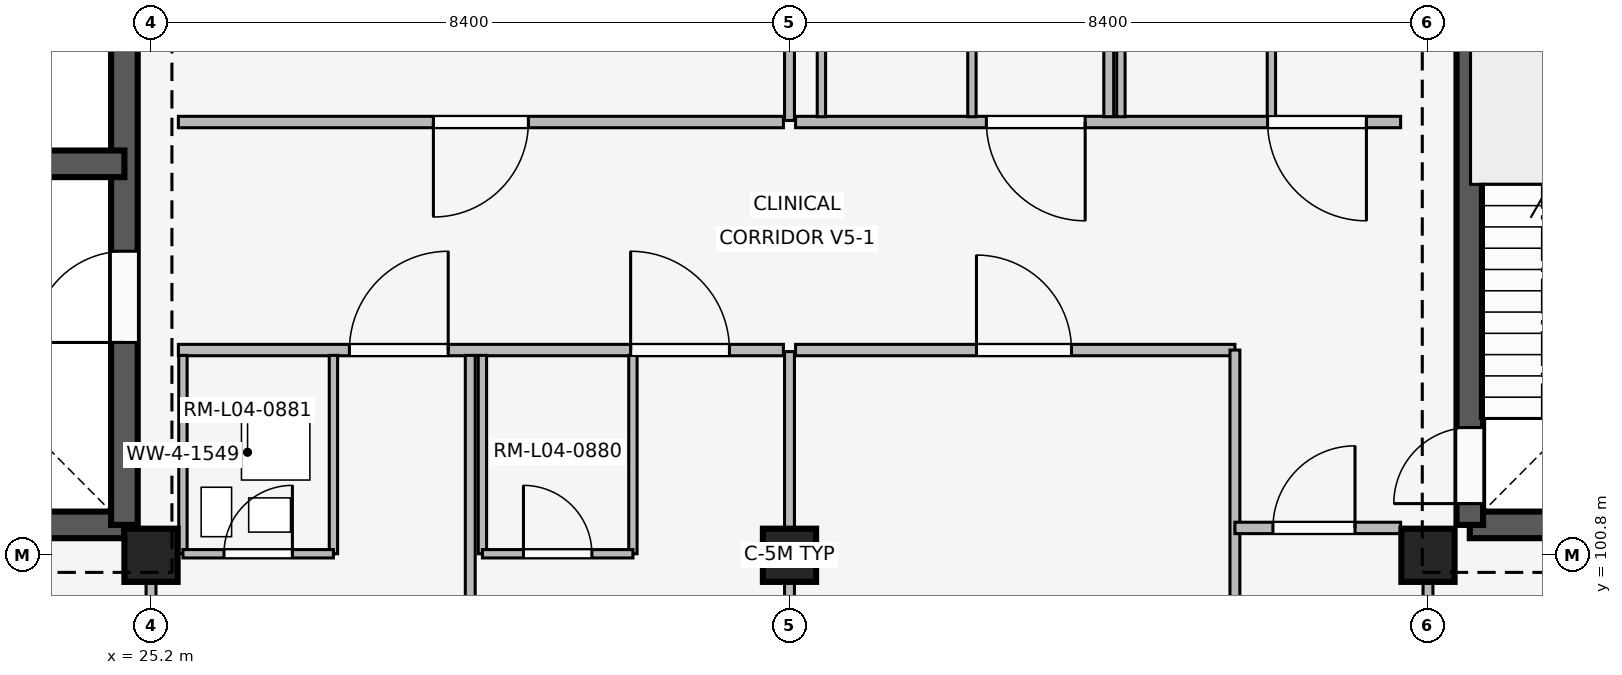
"""IFC4 building model, lengths in metres.
Left out: names, types, materials, properties, quantities, classifications, styles, units other than length and angle.
Written with IfcOpenShell. Run it as: python <this file> out.ifc"""

import sys

from ifc_helpers import new_model, si_unit, direction, frame, frame_2d, origin, origin_2d, place, context, subcontext, project, spatial, rectangle, extrude, element, fill, save


model = new_model("IFC4")
c1 = context("Model", 3, precision=1e-05, world=origin(), true_north=direction((0.0, 1.0)))
c2 = subcontext(c1, "Body", "Model", "MODEL_VIEW")
j1 = project(units=[si_unit("LENGTHUNIT", "METRE"), si_unit("PLANEANGLEUNIT", "RADIAN")], contexts=[c1])
p1 = place(None, origin())
s1 = spatial("IfcSite", under=j1, at=p1, CompositionType="ELEMENT")
p2 = place(p1, origin())
s2 = spatial("IfcBuilding", under=s1, at=p2, CompositionType="ELEMENT")
p3 = place(p2, frame((0.0, 0.0, 16.2)))
s3 = spatial("IfcBuildingStorey", under=s2, at=p3, CompositionType="ELEMENT", Elevation=16.2)
for number, where, z_axis, x_axis in (
    (1, (25.2, 100.8, 0.0), (0.0, 0.0, 1.0), (1.0, 0.0, 0.0)),
    (2, (33.6, 100.8, 0.0), (0.0, 0.0, 1.0), (1.0, 0.0, 0.0)),
    (3, (42.0, 100.8, 0.0), (0.0, 0.0, 1.0), (1.0, 0.0, 0.0)),
):
    element("IfcColumn", number, at=place(p3, frame(where, z_axis=z_axis, x_axis=x_axis)), inside=s3, PredefinedType="COLUMN", context=c2, shape_type="SweptSolid", body=[
        extrude(rectangle(XDim=0.7, YDim=0.7, at=origin_2d()), origin(), (0.0, 0.0, 1.0), 4.2),
    ])
p4 = place(p3, frame((42.55, 101.2, 0.0), z_axis=(0.0, 0.0, 1.0), x_axis=(1.0, 0.0, 0.0)))
e4 = element("IfcWall", 4, at=p4, inside=s3, PredefinedType="SHEAR", context=c2, shape_type="SweptSolid", body=[
    extrude(rectangle(XDim=7.5, YDim=0.35, at=frame_2d((3.75, 0.0))), origin(), (0.0, 0.0, 1.0), 3.92),
])
p5 = place(p4, frame((4.85, 0.0, 0.0)))
e5 = element("IfcOpeningElement", 5, at=p5, cuts=e4, PredefinedType="OPENING", context=c2, shape_type="SweptSolid", body=[
    extrude(rectangle(XDim=1.2, YDim=2.2, at=frame_2d((0.6, 1.1))), frame((0.0, 0.185, 0.0), z_axis=(0.0, -1.0, 0.0), x_axis=(1.0, 0.0, 0.0)), (0.0, 0.0, 1.0), 0.37),
])
p6 = place(p3, frame((42.55, 101.2, 0.0), z_axis=(0.0, 0.0, 1.0), x_axis=(0.0, 1.0, 0.0)))
e6 = element("IfcWall", 6, at=p6, inside=s3, PredefinedType="SHEAR", context=c2, shape_type="SweptSolid", body=[
    extrude(rectangle(XDim=7.55, YDim=0.35, at=frame_2d((3.775, 0.0))), origin(), (0.0, 0.0, 1.0), 3.92),
])
p7 = place(p6, frame((0.28, 0.0, 0.0)))
e7 = element("IfcOpeningElement", 7, at=p7, cuts=e6, PredefinedType="OPENING", context=c2, shape_type="SweptSolid", body=[
    extrude(rectangle(XDim=1.0, YDim=2.15, at=frame_2d((0.5, 1.075))), frame((0.0, 0.185, 0.0), z_axis=(0.0, -1.0, 0.0), x_axis=(1.0, 0.0, 0.0)), (0.0, 0.0, 1.0), 0.37),
])
p8 = place(p3, frame((17.35, 101.2, 0.0), z_axis=(0.0, 0.0, 1.0), x_axis=(1.0, 0.0, 0.0)))
e8 = element("IfcWall", 8, at=p8, inside=s3, PredefinedType="SHEAR", context=c2, shape_type="SweptSolid", body=[
    extrude(rectangle(XDim=7.5, YDim=0.35, at=frame_2d((3.75, 0.0))), origin(), (0.0, 0.0, 1.0), 3.92),
])
p9 = place(p8, frame((4.85, 0.0, 0.0)))
e9 = element("IfcOpeningElement", 9, at=p9, cuts=e8, PredefinedType="OPENING", context=c2, shape_type="SweptSolid", body=[
    extrude(rectangle(XDim=1.2, YDim=2.2, at=frame_2d((0.6, 1.1))), frame((0.0, 0.185, 0.0), z_axis=(0.0, -1.0, 0.0), x_axis=(1.0, 0.0, 0.0)), (0.0, 0.0, 1.0), 0.37),
])
p10 = place(p3, frame((24.85, 101.2, 0.0), z_axis=(0.0, 0.0, 1.0), x_axis=(0.0, 1.0, 0.0)))
e10 = element("IfcWall", 10, at=p10, inside=s3, PredefinedType="SHEAR", context=c2, shape_type="SweptSolid", body=[
    extrude(rectangle(XDim=7.55, YDim=0.35, at=frame_2d((3.775, 0.0))), origin(), (0.0, 0.0, 1.0), 3.92),
])
p11 = place(p10, frame((2.4, 0.0, 0.0)))
e11 = element("IfcOpeningElement", 11, at=p11, cuts=e10, PredefinedType="OPENING", context=c2, shape_type="SweptSolid", body=[
    extrude(rectangle(XDim=1.2, YDim=2.2, at=frame_2d((0.6, 1.1))), frame((0.0, 0.185, 0.0), z_axis=(0.0, -1.0, 0.0), x_axis=(1.0, 0.0, 0.0)), (0.0, 0.0, 1.0), 0.37),
])
p12 = place(p3, frame((21.05, 105.95, 0.0), z_axis=(0.0, 0.0, 1.0), x_axis=(1.0, 0.0, 0.0)))
e12 = element("IfcWall", 12, at=p12, inside=s3, PredefinedType="SHEAR", context=c2, shape_type="SweptSolid", body=[
    extrude(rectangle(XDim=3.8, YDim=0.35, at=frame_2d((1.9, 0.0))), origin(), (0.0, 0.0, 1.0), 3.92),
])
p13 = place(p12, frame((0.32, 0.0, 0.0)))
e13 = element("IfcOpeningElement", 13, at=p13, cuts=e12, PredefinedType="OPENING", context=c2, shape_type="SweptSolid", body=[
    extrude(rectangle(XDim=1.1, YDim=2.15, at=frame_2d((0.55, 1.075))), frame((0.0, 0.185, 0.0), z_axis=(0.0, -1.0, 0.0), x_axis=(1.0, 0.0, 0.0)), (0.0, 0.0, 1.0), 0.37),
])
p14 = place(p3, frame((25.2, 92.54, 0.0), z_axis=(0.0, 0.0, 1.0), x_axis=(0.0, 1.0, 0.0)))
e14 = element("IfcWall", 14, at=p14, inside=s3, PredefinedType="PARTITIONING", context=c2, shape_type="SweptSolid", body=[
    extrude(rectangle(XDim=8.21, YDim=0.13, at=frame_2d((4.105, 0.0))), origin(), (0.0, 0.0, 1.0), 3.3),
])
p15 = place(p14, frame((3.64, 0.0, 0.0)))
e15 = element("IfcOpeningElement", 15, at=p15, cuts=e14, PredefinedType="OPENING", context=c2, shape_type="SweptSolid", body=[
    extrude(rectangle(XDim=1.08, YDim=2.15, at=frame_2d((0.54, 1.075))), frame((0.0, 0.075, 0.0), z_axis=(0.0, -1.0, 0.0), x_axis=(1.0, 0.0, 0.0)), (0.0, 0.0, 1.0), 0.15),
])
p16 = place(p3, frame((25.56, 103.5, 0.0), z_axis=(0.0, 0.0, 1.0), x_axis=(1.0, 0.0, 0.0)))
e16 = element("IfcWall", 16, at=p16, inside=s3, PredefinedType="PARTITIONING", context=c2, shape_type="SweptSolid", body=[
    extrude(rectangle(XDim=7.96, YDim=0.15, at=frame_2d((3.98, 0.0))), origin(), (0.0, 0.0, 1.0), 3.3),
])
p17 = place(p16, frame((2.25, 0.0, 0.0)))
e17 = element("IfcOpeningElement", 17, at=p17, cuts=e16, PredefinedType="OPENING", context=c2, shape_type="SweptSolid", body=[
    extrude(rectangle(XDim=1.3, YDim=2.25, at=frame_2d((0.65, 1.125))), frame((0.0, 0.085, 0.0), z_axis=(0.0, -1.0, 0.0), x_axis=(1.0, 0.0, 0.0)), (0.0, 0.0, 1.0), 0.17),
])
p18 = place(p16, frame((5.95, 0.0, 0.0)))
e18 = element("IfcOpeningElement", 18, at=p18, cuts=e16, PredefinedType="OPENING", context=c2, shape_type="SweptSolid", body=[
    extrude(rectangle(XDim=1.3, YDim=2.25, at=frame_2d((0.65, 1.125))), frame((0.0, 0.085, 0.0), z_axis=(0.0, -1.0, 0.0), x_axis=(1.0, 0.0, 0.0)), (0.0, 0.0, 1.0), 0.17),
])
p19 = place(p3, frame((29.4, 92.5, 0.0), z_axis=(0.0, 0.0, 1.0), x_axis=(0.0, 1.0, 0.0)))
e19 = element("IfcWall", 19, at=p19, inside=s3, PredefinedType="PARTITIONING", context=c2, shape_type="SweptSolid", body=[
    extrude(rectangle(XDim=10.93, YDim=0.13, at=frame_2d((5.465, 0.0))), origin(), (0.0, 0.0, 1.0), 3.3),
])
for number, where, z_axis, x_axis in (
    (20, (25.62, 100.82, 0.0), (0.0, 0.0, 1.0), (0.0, 1.0, 0.0)),
    (21, (27.6, 100.82, 0.0), (0.0, 0.0, 1.0), (0.0, 1.0, 0.0)),
):
    element("IfcWall", number, at=place(p3, frame(where, z_axis=z_axis, x_axis=x_axis)), inside=s3, PredefinedType="PARTITIONING", context=c2, shape_type="SweptSolid", body=[
        extrude(rectangle(XDim=2.61, YDim=0.11, at=frame_2d((1.305, 0.0))), origin(), (0.0, 0.0, 1.0), 3.3),
    ])
p20 = place(p3, frame((25.62, 100.82, 0.0), z_axis=(0.0, 0.0, 1.0), x_axis=(1.0, 0.0, 0.0)))
e22 = element("IfcWall", 22, at=p20, inside=s3, PredefinedType="PARTITIONING", context=c2, shape_type="SweptSolid", body=[
    extrude(rectangle(XDim=1.98, YDim=0.11, at=frame_2d((0.99, 0.0))), origin(), (0.0, 0.0, 1.0), 3.3),
])
p21 = place(p20, frame((0.54, 0.0, 0.0)))
e23 = element("IfcOpeningElement", 23, at=p21, cuts=e22, PredefinedType="OPENING", context=c2, shape_type="SweptSolid", body=[
    extrude(rectangle(XDim=0.9, YDim=2.1, at=frame_2d((0.45, 1.05))), frame((0.0, 0.065, 0.0), z_axis=(0.0, -1.0, 0.0), x_axis=(1.0, 0.0, 0.0)), (0.0, 0.0, 1.0), 0.13),
])
for number, where, z_axis, x_axis in (
    (24, (29.56, 100.82, 0.0), (0.0, 0.0, 1.0), (0.0, 1.0, 0.0)),
    (25, (31.54, 100.82, 0.0), (0.0, 0.0, 1.0), (0.0, 1.0, 0.0)),
):
    element("IfcWall", number, at=place(p3, frame(where, z_axis=z_axis, x_axis=x_axis)), inside=s3, PredefinedType="PARTITIONING", context=c2, shape_type="SweptSolid", body=[
        extrude(rectangle(XDim=2.61, YDim=0.11, at=frame_2d((1.305, 0.0))), origin(), (0.0, 0.0, 1.0), 3.3),
    ])
p22 = place(p3, frame((29.56, 100.82, 0.0), z_axis=(0.0, 0.0, 1.0), x_axis=(1.0, 0.0, 0.0)))
e26 = element("IfcWall", 26, at=p22, inside=s3, PredefinedType="PARTITIONING", context=c2, shape_type="SweptSolid", body=[
    extrude(rectangle(XDim=1.98, YDim=0.11, at=frame_2d((0.99, 0.0))), origin(), (0.0, 0.0, 1.0), 3.3),
])
p23 = place(p22, frame((0.54, 0.0, 0.0)))
e27 = element("IfcOpeningElement", 27, at=p23, cuts=e26, PredefinedType="OPENING", context=c2, shape_type="SweptSolid", body=[
    extrude(rectangle(XDim=0.9, YDim=2.1, at=frame_2d((0.45, 1.05))), frame((0.0, 0.065, 0.0), z_axis=(0.0, -1.0, 0.0), x_axis=(1.0, 0.0, 0.0)), (0.0, 0.0, 1.0), 0.13),
])
p24 = place(p3, frame((33.52, 106.5, 0.0), z_axis=(0.0, 0.0, 1.0), x_axis=(-1.0, 0.0, 0.0)))
e28 = element("IfcWall", 28, at=p24, inside=s3, PredefinedType="PARTITIONING", context=c2, shape_type="SweptSolid", body=[
    extrude(rectangle(XDim=7.96, YDim=0.15, at=frame_2d((3.98, 0.0))), origin(), (0.0, 0.0, 1.0), 3.3),
])
p25 = place(p24, frame((3.355, 0.0, 0.0)))
e29 = element("IfcOpeningElement", 29, at=p25, cuts=e28, PredefinedType="OPENING", context=c2, shape_type="SweptSolid", body=[
    extrude(rectangle(XDim=1.25, YDim=2.2, at=frame_2d((0.625, 1.1))), frame((0.0, 0.085, 0.0), z_axis=(0.0, -1.0, 0.0), x_axis=(1.0, 0.0, 0.0)), (0.0, 0.0, 1.0), 0.17),
])
for number, where, z_axis, x_axis in (
    (30, (33.6, 92.54, 0.0), (0.0, 0.0, 1.0), (0.0, 1.0, 0.0)),
    (31, (33.6, 106.52, 0.0), (0.0, 0.0, 1.0), (0.0, 1.0, 0.0)),
):
    element("IfcWall", number, at=place(p3, frame(where, z_axis=z_axis, x_axis=x_axis)), inside=s3, PredefinedType="PARTITIONING", context=c2, shape_type="SweptSolid", body=[
        extrude(rectangle(XDim=10.94, YDim=0.13, at=frame_2d((5.47, 0.0))), origin(), (0.0, 0.0, 1.0), 3.3),
    ])
p26 = place(p3, frame((33.68, 103.5, 0.0), z_axis=(0.0, 0.0, 1.0), x_axis=(1.0, 0.0, 0.0)))
e32 = element("IfcWall", 32, at=p26, inside=s3, PredefinedType="PARTITIONING", context=c2, shape_type="SweptSolid", body=[
    extrude(rectangle(XDim=5.78, YDim=0.15, at=frame_2d((2.89, 0.0))), origin(), (0.0, 0.0, 1.0), 3.3),
])
p27 = place(p26, frame((2.38, 0.0, 0.0)))
e33 = element("IfcOpeningElement", 33, at=p27, cuts=e32, PredefinedType="OPENING", context=c2, shape_type="SweptSolid", body=[
    extrude(rectangle(XDim=1.25, YDim=2.2, at=frame_2d((0.625, 1.1))), frame((0.0, 0.085, 0.0), z_axis=(0.0, -1.0, 0.0), x_axis=(1.0, 0.0, 0.0)), (0.0, 0.0, 1.0), 0.17),
])
p28 = place(p3, frame((39.46, 92.56, 0.0), z_axis=(0.0, 0.0, 1.0), x_axis=(0.0, 1.0, 0.0)))
e34 = element("IfcWall", 34, at=p28, inside=s3, PredefinedType="PARTITIONING", context=c2, shape_type="SweptSolid", body=[
    extrude(rectangle(XDim=10.94, YDim=0.13, at=frame_2d((5.47, 0.0))), origin(), (0.0, 0.0, 1.0), 3.3),
])
p29 = place(p3, frame((39.46, 101.16, 0.0), z_axis=(0.0, 0.0, 1.0), x_axis=(1.0, 0.0, 0.0)))
e35 = element("IfcWall", 35, at=p29, inside=s3, PredefinedType="PARTITIONING", context=c2, shape_type="SweptSolid", body=[
    extrude(rectangle(XDim=2.18, YDim=0.15, at=frame_2d((1.09, 0.0))), origin(), (0.0, 0.0, 1.0), 3.3),
])
p30 = place(p29, frame((0.5, 0.0, 0.0)))
e36 = element("IfcOpeningElement", 36, at=p30, cuts=e35, PredefinedType="OPENING", context=c2, shape_type="SweptSolid", body=[
    extrude(rectangle(XDim=1.08, YDim=2.15, at=frame_2d((0.54, 1.075))), frame((0.0, 0.085, 0.0), z_axis=(0.0, -1.0, 0.0), x_axis=(1.0, 0.0, 0.0)), (0.0, 0.0, 1.0), 0.17),
])
p31 = place(p3, frame((41.64, 106.5, 0.0), z_axis=(0.0, 0.0, 1.0), x_axis=(-1.0, 0.0, 0.0)))
e37 = element("IfcWall", 37, at=p31, inside=s3, PredefinedType="PARTITIONING", context=c2, shape_type="SweptSolid", body=[
    extrude(rectangle(XDim=7.96, YDim=0.15, at=frame_2d((3.98, 0.0))), origin(), (0.0, 0.0, 1.0), 3.3),
])
p32 = place(p31, frame((0.45, 0.0, 0.0)))
e38 = element("IfcOpeningElement", 38, at=p32, cuts=e37, PredefinedType="OPENING", context=c2, shape_type="SweptSolid", body=[
    extrude(rectangle(XDim=1.3, YDim=2.25, at=frame_2d((0.65, 1.125))), frame((0.0, 0.085, 0.0), z_axis=(0.0, -1.0, 0.0), x_axis=(1.0, 0.0, 0.0)), (0.0, 0.0, 1.0), 0.17),
])
p33 = place(p31, frame((4.15, 0.0, 0.0)))
e39 = element("IfcOpeningElement", 39, at=p33, cuts=e37, PredefinedType="OPENING", context=c2, shape_type="SweptSolid", body=[
    extrude(rectangle(XDim=1.3, YDim=2.25, at=frame_2d((0.65, 1.125))), frame((0.0, 0.085, 0.0), z_axis=(0.0, -1.0, 0.0), x_axis=(1.0, 0.0, 0.0)), (0.0, 0.0, 1.0), 0.17),
])
p34 = place(p3, frame((37.8, 106.57, 0.0), z_axis=(0.0, 0.0, 1.0), x_axis=(0.0, 1.0, 0.0)))
e40 = element("IfcWall", 40, at=p34, inside=s3, PredefinedType="PARTITIONING", context=c2, shape_type="SweptSolid", body=[
    extrude(rectangle(XDim=10.93, YDim=0.13, at=frame_2d((5.465, 0.0))), origin(), (0.0, 0.0, 1.0), 3.3),
])
for number, where, z_axis, x_axis in (
    (41, (34.02, 106.57, 0.0), (0.0, 0.0, 1.0), (0.0, 1.0, 0.0)),
    (42, (36.0, 106.57, 0.0), (0.0, 0.0, 1.0), (0.0, 1.0, 0.0)),
    (43, (37.96, 106.57, 0.0), (0.0, 0.0, 1.0), (0.0, 1.0, 0.0)),
    (44, (39.94, 106.57, 0.0), (0.0, 0.0, 1.0), (0.0, 1.0, 0.0)),
):
    element("IfcWall", number, at=place(p3, frame(where, z_axis=z_axis, x_axis=x_axis)), inside=s3, PredefinedType="PARTITIONING", context=c2, shape_type="SweptSolid", body=[
        extrude(rectangle(XDim=2.61, YDim=0.11, at=frame_2d((1.305, 0.0))), origin(), (0.0, 0.0, 1.0), 3.3),
    ])
p35 = place(p3, frame((42.0, 92.54, 0.0), z_axis=(0.0, 0.0, 1.0), x_axis=(0.0, 1.0, 0.0)))
e45 = element("IfcWall", 45, at=p35, inside=s3, PredefinedType="PARTITIONING", context=c2, shape_type="SweptSolid", body=[
    extrude(rectangle(XDim=8.21, YDim=0.13, at=frame_2d((4.105, 0.0))), origin(), (0.0, 0.0, 1.0), 3.3),
])
p36 = place(p35, frame((3.64, 0.0, 0.0)))
e46 = element("IfcOpeningElement", 46, at=p36, cuts=e45, PredefinedType="OPENING", context=c2, shape_type="SweptSolid", body=[
    extrude(rectangle(XDim=1.08, YDim=2.15, at=frame_2d((0.54, 1.075))), frame((0.0, 0.075, 0.0), z_axis=(0.0, -1.0, 0.0), x_axis=(1.0, 0.0, 0.0)), (0.0, 0.0, 1.0), 0.15),
])
p37 = place(p7, origin())
e47 = element("IfcDoor", 47, at=p37, inside=s3, OperationType="SINGLE_SWING_LEFT", PredefinedType="DOOR", context=c2, shape_type="SweptSolid", body=[
    extrude(rectangle(XDim=1.0, YDim=2.15, at=frame_2d((0.5, 1.075))), frame((0.0, 0.025, 0.0), z_axis=(0.0, -1.0, 0.0), x_axis=(1.0, 0.0, 0.0)), (0.0, 0.0, 1.0), 0.05),
])
fill(e7, e47)
p38 = place(p11, origin())
e48 = element("IfcDoor", 48, at=p38, inside=s3, OperationType="SINGLE_SWING_LEFT", PredefinedType="DOOR", context=c2, shape_type="SweptSolid", body=[
    extrude(rectangle(XDim=1.2, YDim=2.2, at=frame_2d((0.6, 1.1))), frame((0.0, 0.025, 0.0), z_axis=(0.0, -1.0, 0.0), x_axis=(1.0, 0.0, 0.0)), (0.0, 0.0, 1.0), 0.05),
])
fill(e11, e48)
p39 = place(p17, origin())
e49 = element("IfcDoor", 49, at=p39, inside=s3, OperationType="SINGLE_SWING_RIGHT", PredefinedType="DOOR", context=c2, shape_type="SweptSolid", body=[
    extrude(rectangle(XDim=1.3, YDim=2.25, at=frame_2d((0.65, 1.125))), frame((0.0, 0.025, 0.0), z_axis=(0.0, -1.0, 0.0), x_axis=(1.0, 0.0, 0.0)), (0.0, 0.0, 1.0), 0.05),
])
fill(e17, e49)
p40 = place(p18, origin())
e50 = element("IfcDoor", 50, at=p40, inside=s3, OperationType="SINGLE_SWING_LEFT", PredefinedType="DOOR", context=c2, shape_type="SweptSolid", body=[
    extrude(rectangle(XDim=1.3, YDim=2.25, at=frame_2d((0.65, 1.125))), frame((0.0, 0.025, 0.0), z_axis=(0.0, -1.0, 0.0), x_axis=(1.0, 0.0, 0.0)), (0.0, 0.0, 1.0), 0.05),
])
fill(e18, e50)
p41 = place(p21, origin())
e51 = element("IfcDoor", 51, at=p41, inside=s3, OperationType="SINGLE_SWING_RIGHT", PredefinedType="DOOR", context=c2, shape_type="SweptSolid", body=[
    extrude(rectangle(XDim=0.9, YDim=2.1, at=frame_2d((0.45, 1.05))), frame((0.0, 0.025, 0.0), z_axis=(0.0, -1.0, 0.0), x_axis=(1.0, 0.0, 0.0)), (0.0, 0.0, 1.0), 0.05),
])
fill(e23, e51)
p42 = place(p23, origin())
e52 = element("IfcDoor", 52, at=p42, inside=s3, OperationType="SINGLE_SWING_LEFT", PredefinedType="DOOR", context=c2, shape_type="SweptSolid", body=[
    extrude(rectangle(XDim=0.9, YDim=2.1, at=frame_2d((0.45, 1.05))), frame((0.0, 0.025, 0.0), z_axis=(0.0, -1.0, 0.0), x_axis=(1.0, 0.0, 0.0)), (0.0, 0.0, 1.0), 0.05),
])
fill(e27, e52)
p43 = place(p25, origin())
e53 = element("IfcDoor", 53, at=p43, inside=s3, OperationType="SINGLE_SWING_RIGHT", PredefinedType="DOOR", context=c2, shape_type="SweptSolid", body=[
    extrude(rectangle(XDim=1.25, YDim=2.2, at=frame_2d((0.625, 1.1))), frame((0.0, 0.025, 0.0), z_axis=(0.0, -1.0, 0.0), x_axis=(1.0, 0.0, 0.0)), (0.0, 0.0, 1.0), 0.05),
])
fill(e29, e53)
p44 = place(p27, origin())
e54 = element("IfcDoor", 54, at=p44, inside=s3, OperationType="SINGLE_SWING_LEFT", PredefinedType="DOOR", context=c2, shape_type="SweptSolid", body=[
    extrude(rectangle(XDim=1.25, YDim=2.2, at=frame_2d((0.625, 1.1))), frame((0.0, 0.025, 0.0), z_axis=(0.0, -1.0, 0.0), x_axis=(1.0, 0.0, 0.0)), (0.0, 0.0, 1.0), 0.05),
])
fill(e33, e54)
p45 = place(p30, origin())
e55 = element("IfcDoor", 55, at=p45, inside=s3, OperationType="SINGLE_SWING_RIGHT", PredefinedType="DOOR", context=c2, shape_type="SweptSolid", body=[
    extrude(rectangle(XDim=1.08, YDim=2.15, at=frame_2d((0.54, 1.075))), frame((0.0, 0.025, 0.0), z_axis=(0.0, -1.0, 0.0), x_axis=(1.0, 0.0, 0.0)), (0.0, 0.0, 1.0), 0.05),
])
fill(e36, e55)
p46 = place(p32, origin())
e56 = element("IfcDoor", 56, at=p46, inside=s3, OperationType="SINGLE_SWING_LEFT", PredefinedType="DOOR", context=c2, shape_type="SweptSolid", body=[
    extrude(rectangle(XDim=1.3, YDim=2.25, at=frame_2d((0.65, 1.125))), frame((0.0, 0.025, 0.0), z_axis=(0.0, -1.0, 0.0), x_axis=(1.0, 0.0, 0.0)), (0.0, 0.0, 1.0), 0.05),
])
fill(e38, e56)
p47 = place(p33, origin())
e57 = element("IfcDoor", 57, at=p47, inside=s3, OperationType="SINGLE_SWING_LEFT", PredefinedType="DOOR", context=c2, shape_type="SweptSolid", body=[
    extrude(rectangle(XDim=1.3, YDim=2.25, at=frame_2d((0.65, 1.125))), frame((0.0, 0.025, 0.0), z_axis=(0.0, -1.0, 0.0), x_axis=(1.0, 0.0, 0.0)), (0.0, 0.0, 1.0), 0.05),
])
fill(e39, e57)
save(model, sys.argv[1])
